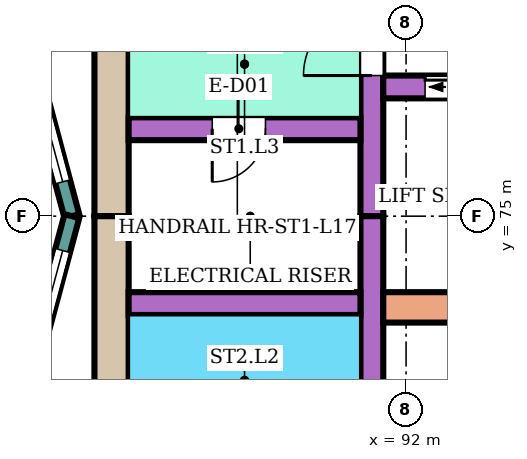
"""IFC4 building model, lengths in metres.
Left out: names, types, materials, properties, quantities, classifications, styles, units other than length and angle.
Written with IfcOpenShell. Run it as: python <this file> out.ifc"""

import sys

from ifc_helpers import new_model, si_unit, direction, frame, frame_2d, origin, place, context, subcontext, project, spatial, rectangle, extrude, element, fill, save


model = new_model("IFC4")
c1 = context("Model", 3, precision=1e-05, world=origin(), true_north=direction((0.0, 1.0)))
c2 = subcontext(c1, "Body", "Model", "MODEL_VIEW")
j1 = project(units=[si_unit("LENGTHUNIT", "METRE"), si_unit("PLANEANGLEUNIT", "RADIAN")], contexts=[c1])
p1 = place(None, origin())
s1 = spatial("IfcSite", under=j1, at=p1, CompositionType="ELEMENT")
p2 = place(p1, origin())
s2 = spatial("IfcBuilding", under=s1, at=p2, CompositionType="ELEMENT")
p3 = place(p2, frame((0.0, 0.0, 74.4)))
s3 = spatial("IfcBuildingStorey", under=s2, at=p3, CompositionType="ELEMENT", Elevation=74.4)
for number, where, z_axis, x_axis in (
    (1, (88.125, 75.0, 0.0), (0.0, 0.0, 1.0), (0.0, 1.0, 0.0)),
    (2, (88.125, 67.4, 0.0), (0.0, 0.0, 1.0), (0.0, 1.0, 0.0)),
):
    element("IfcWall", number, at=place(p3, frame(where, z_axis=z_axis, x_axis=x_axis)), inside=s3, PredefinedType="SHEAR", context=c2, shape_type="SweptSolid", body=[
        extrude(rectangle(XDim=7.6, YDim=0.45, at=frame_2d((3.8, 0.0))), origin(), (0.0, 0.0, 1.0), 7.68),
    ])
p4 = place(p3, frame((91.55, 75.0, 0.0), z_axis=(0.0, 0.0, 1.0), x_axis=(0.0, 1.0, 0.0)))
e3 = element("IfcWall", 3, at=p4, inside=s3, PredefinedType="SHEAR", context=c2, shape_type="SweptSolid", body=[
    extrude(rectangle(XDim=7.6, YDim=0.3, at=frame_2d((3.8, 0.0))), origin(), (0.0, 0.0, 1.0), 7.68),
])
p5 = place(p4, frame((1.85, 0.0, 0.0)))
e4 = element("IfcOpeningElement", 4, at=p5, cuts=e3, PredefinedType="OPENING", context=c2, shape_type="SweptSolid", body=[
    extrude(rectangle(XDim=0.9, YDim=2.1, at=frame_2d((0.45, 1.05))), frame((0.0, 0.16, 0.0), z_axis=(0.0, -1.0, 0.0), x_axis=(1.0, 0.0, 0.0)), (0.0, 0.0, 1.0), 0.32),
])
p6 = place(p3, frame((91.55, 67.4, 0.0), z_axis=(0.0, 0.0, 1.0), x_axis=(0.0, 1.0, 0.0)))
e5 = element("IfcWall", 5, at=p6, inside=s3, PredefinedType="SHEAR", context=c2, shape_type="SweptSolid", body=[
    extrude(rectangle(XDim=7.6, YDim=0.3, at=frame_2d((3.8, 0.0))), origin(), (0.0, 0.0, 1.0), 7.68),
])
p7 = place(p6, frame((0.25, 0.0, 0.0)))
e6 = element("IfcOpeningElement", 6, at=p7, cuts=e5, PredefinedType="OPENING", context=c2, shape_type="SweptSolid", body=[
    extrude(rectangle(XDim=0.9, YDim=2.1, at=frame_2d((0.45, 1.05))), frame((0.0, 0.16, 0.0), z_axis=(0.0, -1.0, 0.0), x_axis=(1.0, 0.0, 0.0)), (0.0, 0.0, 1.0), 0.32),
])
p8 = place(p3, frame((88.35, 76.15, 0.0), z_axis=(0.0, 0.0, 1.0), x_axis=(1.0, 0.0, 0.0)))
e7 = element("IfcWall", 7, at=p8, inside=s3, PredefinedType="SHEAR", context=c2, shape_type="SweptSolid", body=[
    extrude(rectangle(XDim=3.05, YDim=0.3, at=frame_2d((1.525, 0.0))), origin(), (0.0, 0.0, 1.0), 7.68),
])
p9 = place(p8, frame((1.1, 0.0, 0.0)))
e8 = element("IfcOpeningElement", 8, at=p9, cuts=e7, PredefinedType="OPENING", context=c2, shape_type="SweptSolid", body=[
    extrude(rectangle(XDim=0.7, YDim=2.0, at=frame_2d((0.35, 1.0))), frame((0.0, 0.16, 0.0), z_axis=(0.0, -1.0, 0.0), x_axis=(1.0, 0.0, 0.0)), (0.0, 0.0, 1.0), 0.32),
])
p10 = place(p3, frame((88.35, 73.85, 0.0), z_axis=(0.0, 0.0, 1.0), x_axis=(1.0, 0.0, 0.0)))
e9 = element("IfcWall", 9, at=p10, inside=s3, PredefinedType="SHEAR", context=c2, shape_type="SweptSolid", body=[
    extrude(rectangle(XDim=3.05, YDim=0.3, at=frame_2d((1.525, 0.0))), origin(), (0.0, 0.0, 1.0), 7.68),
])
p11 = place(p3, frame((91.7, 76.7, 0.0), z_axis=(0.0, 0.0, 1.0), x_axis=(1.0, 0.0, 0.0)))
e10 = element("IfcWall", 10, at=p11, inside=s3, PredefinedType="SHEAR", context=c2, shape_type="SweptSolid", body=[
    extrude(rectangle(XDim=10.9, YDim=0.3, at=frame_2d((5.45, 0.0))), origin(), (0.0, 0.0, 1.0), 7.68),
])
p12 = place(p11, frame((0.55, 0.0, 0.0)))
e11 = element("IfcOpeningElement", 11, at=p12, cuts=e10, PredefinedType="OPENING", context=c2, shape_type="SweptSolid", body=[
    extrude(rectangle(XDim=1.1, YDim=2.1, at=frame_2d((0.55, 1.05))), frame((0.0, 0.16, 0.0), z_axis=(0.0, -1.0, 0.0), x_axis=(1.0, 0.0, 0.0)), (0.0, 0.0, 1.0), 0.32),
])
p13 = place(p11, frame((8.1, 0.0, 0.0)))
e12 = element("IfcOpeningElement", 12, at=p13, cuts=e10, PredefinedType="OPENING", context=c2, shape_type="SweptSolid", body=[
    extrude(rectangle(XDim=1.0, YDim=2.1, at=frame_2d((0.5, 1.05))), frame((0.0, 0.16, 0.0), z_axis=(0.0, -1.0, 0.0), x_axis=(1.0, 0.0, 0.0)), (0.0, 0.0, 1.0), 0.32),
])
p14 = place(p3, frame((91.7, 73.8, 0.0), z_axis=(0.0, 0.0, 1.0), x_axis=(1.0, 0.0, 0.0)))
e13 = element("IfcWall", 13, at=p14, inside=s3, PredefinedType="SHEAR", context=c2, shape_type="SweptSolid", body=[
    extrude(rectangle(XDim=10.9, YDim=0.4, at=frame_2d((5.45, 0.0))), origin(), (0.0, 0.0, 1.0), 7.68),
])
p15 = place(p3, frame((87.604, 75.0, 0.0), z_axis=(0.0, 0.0, 1.0), x_axis=(-0.258789828301, 0.965933654434, 0.0)))
e14 = element("IfcWall", 14, at=p15, inside=s3, PredefinedType="NOTDEFINED", context=c2, shape_type="SweptSolid", body=[
    extrude(rectangle(XDim=3.936, YDim=0.2, at=frame_2d((1.968, 0.0))), origin(), (0.0, 0.0, 1.0), 8.0),
])
p16 = place(p15, frame((0.468, 0.0, 0.9)))
e15 = element("IfcOpeningElement", 15, at=p16, cuts=e14, PredefinedType="OPENING", context=c2, shape_type="SweptSolid", body=[
    extrude(rectangle(XDim=3.0, YDim=2.3, at=frame_2d((1.5, 1.15))), frame((0.0, 0.11, 0.0), z_axis=(0.0, -1.0, 0.0), x_axis=(1.0, 0.0, 0.0)), (0.0, 0.0, 1.0), 0.22),
])
p17 = place(p3, frame((86.585, 71.198, 0.0), z_axis=(0.0, 0.0, 1.0), x_axis=(0.258789828301, 0.965933654434, 0.0)))
e16 = element("IfcWall", 16, at=p17, inside=s3, PredefinedType="NOTDEFINED", context=c2, shape_type="SweptSolid", body=[
    extrude(rectangle(XDim=3.936, YDim=0.2, at=frame_2d((1.968, 0.0))), origin(), (0.0, 0.0, 1.0), 8.0),
])
p18 = place(p17, frame((0.468, 0.0, 0.9)))
e17 = element("IfcOpeningElement", 17, at=p18, cuts=e16, PredefinedType="OPENING", context=c2, shape_type="SweptSolid", body=[
    extrude(rectangle(XDim=3.0, YDim=2.3, at=frame_2d((1.5, 1.15))), frame((0.0, 0.11, 0.0), z_axis=(0.0, -1.0, 0.0), x_axis=(1.0, 0.0, 0.0)), (0.0, 0.0, 1.0), 0.22),
])
p19 = place(p16, origin())
e18 = element("IfcWindow", 18, at=p19, inside=s3, PartitioningType="SINGLE_PANEL", PredefinedType="WINDOW", context=c2, shape_type="SweptSolid", body=[
    extrude(rectangle(XDim=3.0, YDim=2.3, at=frame_2d((1.5, 1.15))), frame((0.0, 0.03, 0.0), z_axis=(0.0, -1.0, 0.0), x_axis=(1.0, 0.0, 0.0)), (0.0, 0.0, 1.0), 0.06),
])
fill(e15, e18)
p20 = place(p18, origin())
e19 = element("IfcWindow", 19, at=p20, inside=s3, PartitioningType="SINGLE_PANEL", PredefinedType="WINDOW", context=c2, shape_type="SweptSolid", body=[
    extrude(rectangle(XDim=3.0, YDim=2.3, at=frame_2d((1.5, 1.15))), frame((0.0, 0.03, 0.0), z_axis=(0.0, -1.0, 0.0), x_axis=(1.0, 0.0, 0.0)), (0.0, 0.0, 1.0), 0.06),
])
fill(e17, e19)
p21 = place(p9, frame((0.7, 0.0, 0.0), z_axis=(0.0, 0.0, 1.0), x_axis=(-1.0, 0.0, 0.0)))
e20 = element("IfcDoor", 20, at=p21, inside=s3, OperationType="SINGLE_SWING_RIGHT", PredefinedType="DOOR", context=c2, shape_type="SweptSolid", body=[
    extrude(rectangle(XDim=0.7, YDim=2.0, at=frame_2d((0.35, 1.0))), frame((0.0, 0.025, 0.0), z_axis=(0.0, -1.0, 0.0), x_axis=(1.0, 0.0, 0.0)), (0.0, 0.0, 1.0), 0.05),
])
fill(e8, e20)
p22 = place(p5, origin())
e21 = element("IfcDoor", 21, at=p22, inside=s3, OperationType="SINGLE_SWING_LEFT", PredefinedType="DOOR", context=c2, shape_type="SweptSolid", body=[
    extrude(rectangle(XDim=0.9, YDim=2.1, at=frame_2d((0.45, 1.05))), frame((0.0, 0.025, 0.0), z_axis=(0.0, -1.0, 0.0), x_axis=(1.0, 0.0, 0.0)), (0.0, 0.0, 1.0), 0.05),
])
fill(e4, e21)
p23 = place(p12, origin())
e22 = element("IfcDoor", 22, at=p23, inside=s3, OperationType="DOUBLE_DOOR_SLIDING", PredefinedType="DOOR", context=c2, shape_type="SweptSolid", body=[
    extrude(rectangle(XDim=1.1, YDim=2.1, at=frame_2d((0.55, 1.05))), frame((0.0, 0.025, 0.0), z_axis=(0.0, -1.0, 0.0), x_axis=(1.0, 0.0, 0.0)), (0.0, 0.0, 1.0), 0.05),
])
fill(e11, e22)
save(model, sys.argv[1])
